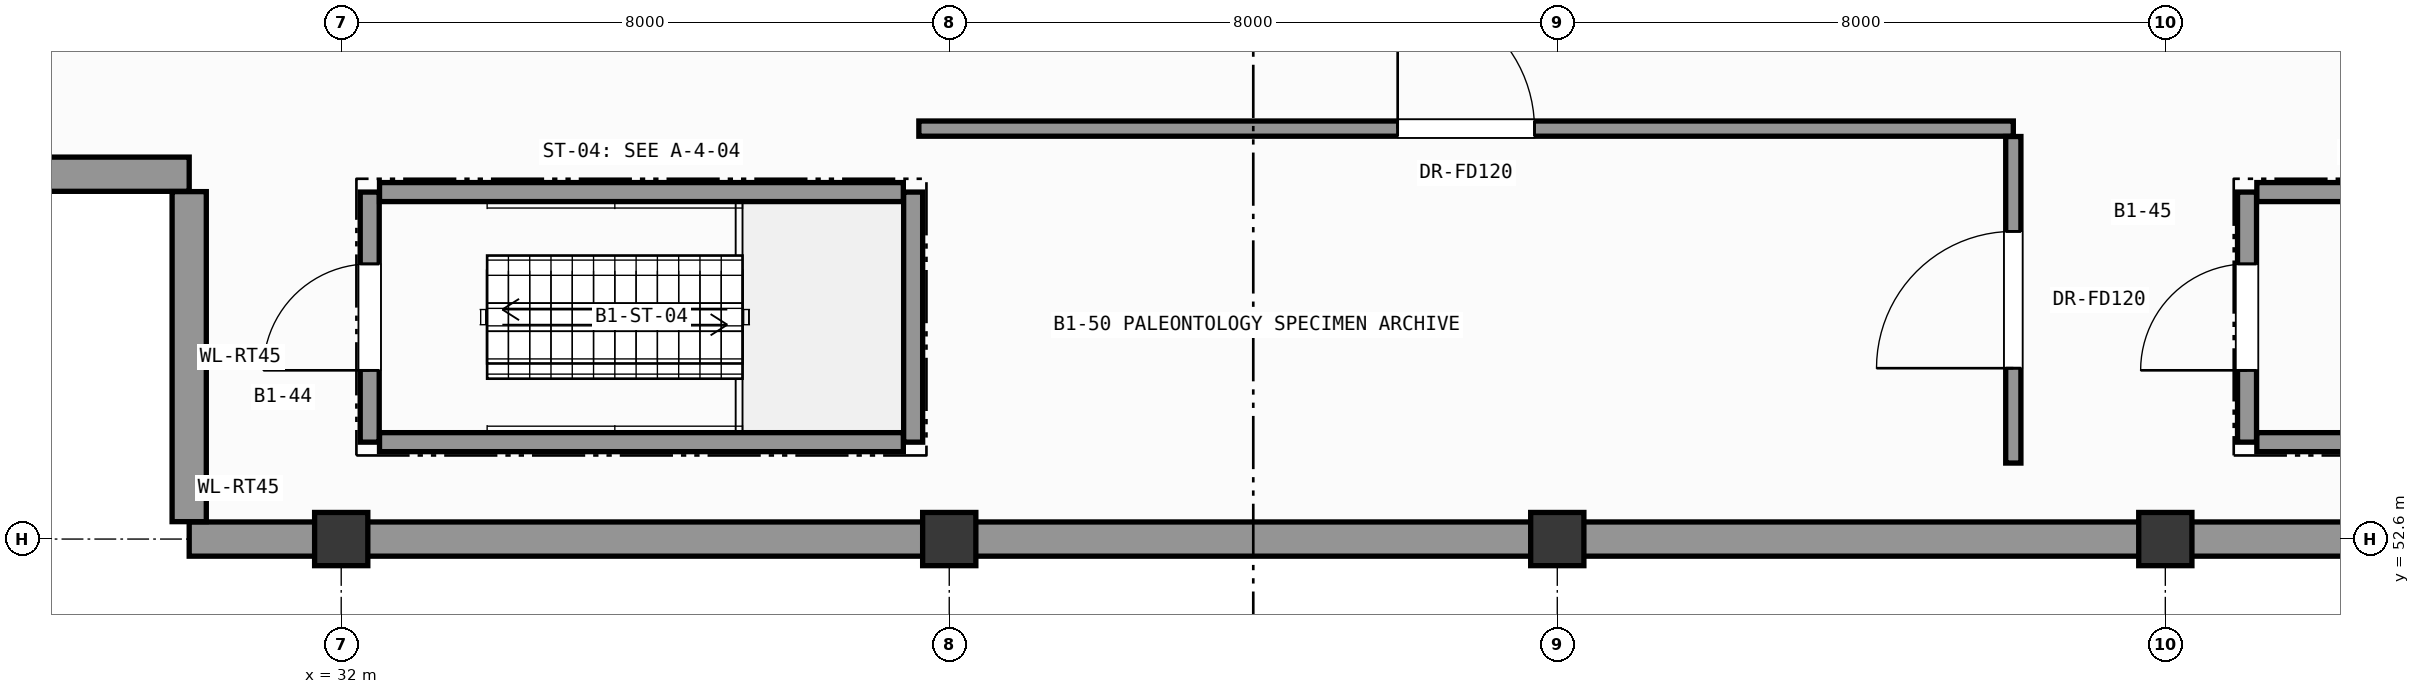
"""IFC4 building model, lengths in metres.
Left out: names, types, materials, properties, quantities, classifications, styles, units other than length and angle.
Written with IfcOpenShell. Run it as: python <this file> out.ifc"""

import sys

from ifc_helpers import new_model, si_unit, direction, frame, frame_2d, origin, origin_2d, place, context, subcontext, project, spatial, rectangle, extrude, element, fill, save


model = new_model("IFC4")
c1 = context("Model", 3, precision=1e-05, world=origin(), true_north=direction((0.0, 1.0)))
c2 = subcontext(c1, "Body", "Model", "MODEL_VIEW")
j1 = project(units=[si_unit("LENGTHUNIT", "METRE"), si_unit("PLANEANGLEUNIT", "RADIAN")], contexts=[c1])
p1 = place(None, origin())
s1 = spatial("IfcSite", under=j1, at=p1, CompositionType="ELEMENT")
p2 = place(p1, origin())
s2 = spatial("IfcBuilding", under=s1, at=p2, CompositionType="ELEMENT")
p3 = place(p2, frame((0.0, 0.0, -4.8)))
s3 = spatial("IfcBuildingStorey", under=s2, at=p3, CompositionType="ELEMENT", Elevation=-4.8)
for number, where, z_axis, x_axis in (
    (1, (32.0, 52.6, 0.0), (0.0, 0.0, 1.0), (1.0, 0.0, 0.0)),
    (2, (40.0, 52.6, 0.0), (0.0, 0.0, 1.0), (1.0, 0.0, 0.0)),
    (3, (48.0, 52.6, 0.0), (0.0, 0.0, 1.0), (1.0, 0.0, 0.0)),
    (4, (56.0, 52.6, 0.0), (0.0, 0.0, 1.0), (1.0, 0.0, 0.0)),
):
    element("IfcColumn", number, at=place(p3, frame(where, z_axis=z_axis, x_axis=x_axis)), inside=s3, PredefinedType="COLUMN", context=c2, shape_type="SweptSolid", body=[
        extrude(rectangle(XDim=0.7, YDim=0.7, at=origin_2d()), origin(), (0.0, 0.0, 1.0), 4.8),
    ])
p4 = place(p3, frame((32.0, 52.6, 0.0), z_axis=(0.0, 0.0, 1.0), x_axis=(-1.0, 0.0, 0.0)))
e5 = element("IfcWall", 5, at=p4, inside=s3, PredefinedType="USERDEFINED", context=c2, shape_type="SweptSolid", body=[
    extrude(rectangle(XDim=2.0, YDim=0.45, at=frame_2d((1.0, 0.0))), origin(), (0.0, 0.0, 1.0), 4.5),
])
for number, where, z_axis, x_axis in (
    (6, (40.0, 52.6, 0.0), (0.0, 0.0, 1.0), (-1.0, 0.0, 0.0)),
    (7, (48.0, 52.6, 0.0), (0.0, 0.0, 1.0), (-1.0, 0.0, 0.0)),
    (8, (56.0, 52.6, 0.0), (0.0, 0.0, 1.0), (-1.0, 0.0, 0.0)),
):
    element("IfcWall", number, at=place(p3, frame(where, z_axis=z_axis, x_axis=x_axis)), inside=s3, PredefinedType="USERDEFINED", context=c2, shape_type="SweptSolid", body=[
        extrude(rectangle(XDim=8.0, YDim=0.45, at=frame_2d((4.0, 0.0))), origin(), (0.0, 0.0, 1.0), 4.5),
    ])
p5 = place(p3, frame((70.0, 52.6, 0.0), z_axis=(0.0, 0.0, 1.0), x_axis=(-1.0, 0.0, 0.0)))
e9 = element("IfcWall", 9, at=p5, inside=s3, PredefinedType="USERDEFINED", context=c2, shape_type="SweptSolid", body=[
    extrude(rectangle(XDim=14.0, YDim=0.45, at=frame_2d((7.0, 0.0))), origin(), (0.0, 0.0, 1.0), 4.5),
])
p6 = place(p3, frame((30.0, 57.4, 0.0), z_axis=(0.0, 0.0, 1.0), x_axis=(-1.0, 0.0, 0.0)))
e10 = element("IfcWall", 10, at=p6, inside=s3, PredefinedType="USERDEFINED", context=c2, shape_type="SweptSolid", body=[
    extrude(rectangle(XDim=5.771, YDim=0.45, at=frame_2d((2.885, 0.0))), origin(), (0.0, 0.0, 1.0), 4.5),
])
p7 = place(p3, frame((30.0, 52.829, 0.0), z_axis=(0.0, 0.0, 1.0), x_axis=(0.0, 1.0, 0.0)))
e11 = element("IfcWall", 11, at=p7, inside=s3, PredefinedType="USERDEFINED", context=c2, shape_type="SweptSolid", body=[
    extrude(rectangle(XDim=4.342, YDim=0.45, at=frame_2d((2.171, 0.0))), origin(), (0.0, 0.0, 1.0), 4.5),
])
p8 = place(p3, frame((57.075, 53.875, 0.0), z_axis=(0.0, 0.0, 1.0), x_axis=(0.0, 1.0, 0.0)))
e12 = element("IfcWall", 12, at=p8, inside=s3, PredefinedType="SHEAR", context=c2, shape_type="SweptSolid", body=[
    extrude(rectangle(XDim=3.29, YDim=0.25, at=frame_2d((1.645, 0.0))), origin(), (0.0, 0.0, 1.0), 4.5),
])
p9 = place(p8, frame((0.945, 0.0, 0.0)))
e13 = element("IfcOpeningElement", 13, at=p9, cuts=e12, PredefinedType="OPENING", context=c2, shape_type="SweptSolid", body=[
    extrude(rectangle(XDim=1.4, YDim=2.2, at=frame_2d((0.7, 1.1))), frame((0.0, 0.135, 0.0), z_axis=(0.0, -1.0, 0.0), x_axis=(1.0, 0.0, 0.0)), (0.0, 0.0, 1.0), 0.27),
])
for number, where, z_axis, x_axis in (
    (14, (57.204, 53.875, 0.0), (0.0, 0.0, 1.0), (1.0, 0.0, 0.0)),
    (15, (57.204, 57.165, 0.0), (0.0, 0.0, 1.0), (1.0, 0.0, 0.0)),
):
    element("IfcWall", number, at=place(p3, frame(where, z_axis=z_axis, x_axis=x_axis)), inside=s3, PredefinedType="SHEAR", context=c2, shape_type="SweptSolid", body=[
        extrude(rectangle(XDim=7.192, YDim=0.25, at=frame_2d((3.596, 0.0))), origin(), (0.0, 0.0, 1.0), 4.5),
    ])
p10 = place(p3, frame((32.375, 53.875, 0.0), z_axis=(0.0, 0.0, 1.0), x_axis=(0.0, 1.0, 0.0)))
e16 = element("IfcWall", 16, at=p10, inside=s3, PredefinedType="SHEAR", context=c2, shape_type="SweptSolid", body=[
    extrude(rectangle(XDim=3.29, YDim=0.25, at=frame_2d((1.645, 0.0))), origin(), (0.0, 0.0, 1.0), 4.5),
])
p11 = place(p10, frame((0.945, 0.0, 0.0)))
e17 = element("IfcOpeningElement", 17, at=p11, cuts=e16, PredefinedType="OPENING", context=c2, shape_type="SweptSolid", body=[
    extrude(rectangle(XDim=1.4, YDim=2.2, at=frame_2d((0.7, 1.1))), frame((0.0, 0.135, 0.0), z_axis=(0.0, -1.0, 0.0), x_axis=(1.0, 0.0, 0.0)), (0.0, 0.0, 1.0), 0.27),
])
p12 = place(p3, frame((39.525, 53.875, 0.0), z_axis=(0.0, 0.0, 1.0), x_axis=(0.0, 1.0, 0.0)))
e18 = element("IfcWall", 18, at=p12, inside=s3, PredefinedType="SHEAR", context=c2, shape_type="SweptSolid", body=[
    extrude(rectangle(XDim=3.29, YDim=0.25, at=frame_2d((1.645, 0.0))), origin(), (0.0, 0.0, 1.0), 4.5),
])
for number, where, z_axis, x_axis in (
    (19, (32.504, 53.875, 0.0), (0.0, 0.0, 1.0), (1.0, 0.0, 0.0)),
    (20, (32.504, 57.165, 0.0), (0.0, 0.0, 1.0), (1.0, 0.0, 0.0)),
):
    element("IfcWall", number, at=place(p3, frame(where, z_axis=z_axis, x_axis=x_axis)), inside=s3, PredefinedType="SHEAR", context=c2, shape_type="SweptSolid", body=[
        extrude(rectangle(XDim=6.892, YDim=0.25, at=frame_2d((3.446, 0.0))), origin(), (0.0, 0.0, 1.0), 4.5),
    ])
p13 = place(p3, frame((39.6, 58.0, 0.0), z_axis=(0.0, 0.0, 1.0), x_axis=(1.0, 0.0, 0.0)))
e21 = element("IfcWall", 21, at=p13, inside=s3, PredefinedType="PARTITIONING", context=c2, shape_type="SweptSolid", body=[
    extrude(rectangle(XDim=14.4, YDim=0.2, at=frame_2d((7.2, 0.0))), origin(), (0.0, 0.0, 1.0), 4.5),
])
p14 = place(p13, frame((6.3, 0.0, 0.0)))
e22 = element("IfcOpeningElement", 22, at=p14, cuts=e21, PredefinedType="OPENING", context=c2, shape_type="SweptSolid", body=[
    extrude(rectangle(XDim=1.8, YDim=2.4, at=frame_2d((0.9, 1.2))), frame((0.0, 0.11, 0.0), z_axis=(0.0, -1.0, 0.0), x_axis=(1.0, 0.0, 0.0)), (0.0, 0.0, 1.0), 0.22),
])
p15 = place(p3, frame((54.0, 53.6, 0.0), z_axis=(0.0, 0.0, 1.0), x_axis=(0.0, 1.0, 0.0)))
e23 = element("IfcWall", 23, at=p15, inside=s3, PredefinedType="PARTITIONING", context=c2, shape_type="SweptSolid", body=[
    extrude(rectangle(XDim=4.296, YDim=0.2, at=frame_2d((2.148, 0.0))), origin(), (0.0, 0.0, 1.0), 4.5),
])
p16 = place(p15, frame((1.248, 0.0, 0.0)))
e24 = element("IfcOpeningElement", 24, at=p16, cuts=e23, PredefinedType="OPENING", context=c2, shape_type="SweptSolid", body=[
    extrude(rectangle(XDim=1.8, YDim=2.4, at=frame_2d((0.9, 1.2))), frame((0.0, 0.11, 0.0), z_axis=(0.0, -1.0, 0.0), x_axis=(1.0, 0.0, 0.0)), (0.0, 0.0, 1.0), 0.22),
])
p17 = place(p9, origin())
e25 = element("IfcDoor", 25, at=p17, inside=s3, OperationType="SINGLE_SWING_LEFT", PredefinedType="DOOR", context=c2, shape_type="SweptSolid", body=[
    extrude(rectangle(XDim=1.4, YDim=2.2, at=frame_2d((0.7, 1.1))), frame((0.0, 0.025, 0.0), z_axis=(0.0, -1.0, 0.0), x_axis=(1.0, 0.0, 0.0)), (0.0, 0.0, 1.0), 0.05),
])
fill(e13, e25)
p18 = place(p11, origin())
e26 = element("IfcDoor", 26, at=p18, inside=s3, OperationType="SINGLE_SWING_LEFT", PredefinedType="DOOR", context=c2, shape_type="SweptSolid", body=[
    extrude(rectangle(XDim=1.4, YDim=2.2, at=frame_2d((0.7, 1.1))), frame((0.0, 0.025, 0.0), z_axis=(0.0, -1.0, 0.0), x_axis=(1.0, 0.0, 0.0)), (0.0, 0.0, 1.0), 0.05),
])
fill(e17, e26)
p19 = place(p14, origin())
e27 = element("IfcDoor", 27, at=p19, inside=s3, OperationType="SINGLE_SWING_LEFT", PredefinedType="DOOR", context=c2, shape_type="SweptSolid", body=[
    extrude(rectangle(XDim=1.8, YDim=2.4, at=frame_2d((0.9, 1.2))), frame((0.0, 0.025, 0.0), z_axis=(0.0, -1.0, 0.0), x_axis=(1.0, 0.0, 0.0)), (0.0, 0.0, 1.0), 0.05),
])
fill(e22, e27)
p20 = place(p16, origin())
e28 = element("IfcDoor", 28, at=p20, inside=s3, OperationType="SINGLE_SWING_LEFT", PredefinedType="DOOR", context=c2, shape_type="SweptSolid", body=[
    extrude(rectangle(XDim=1.8, YDim=2.4, at=frame_2d((0.9, 1.2))), frame((0.0, 0.025, 0.0), z_axis=(0.0, -1.0, 0.0), x_axis=(1.0, 0.0, 0.0)), (0.0, 0.0, 1.0), 0.05),
])
fill(e24, e28)
save(model, sys.argv[1])
